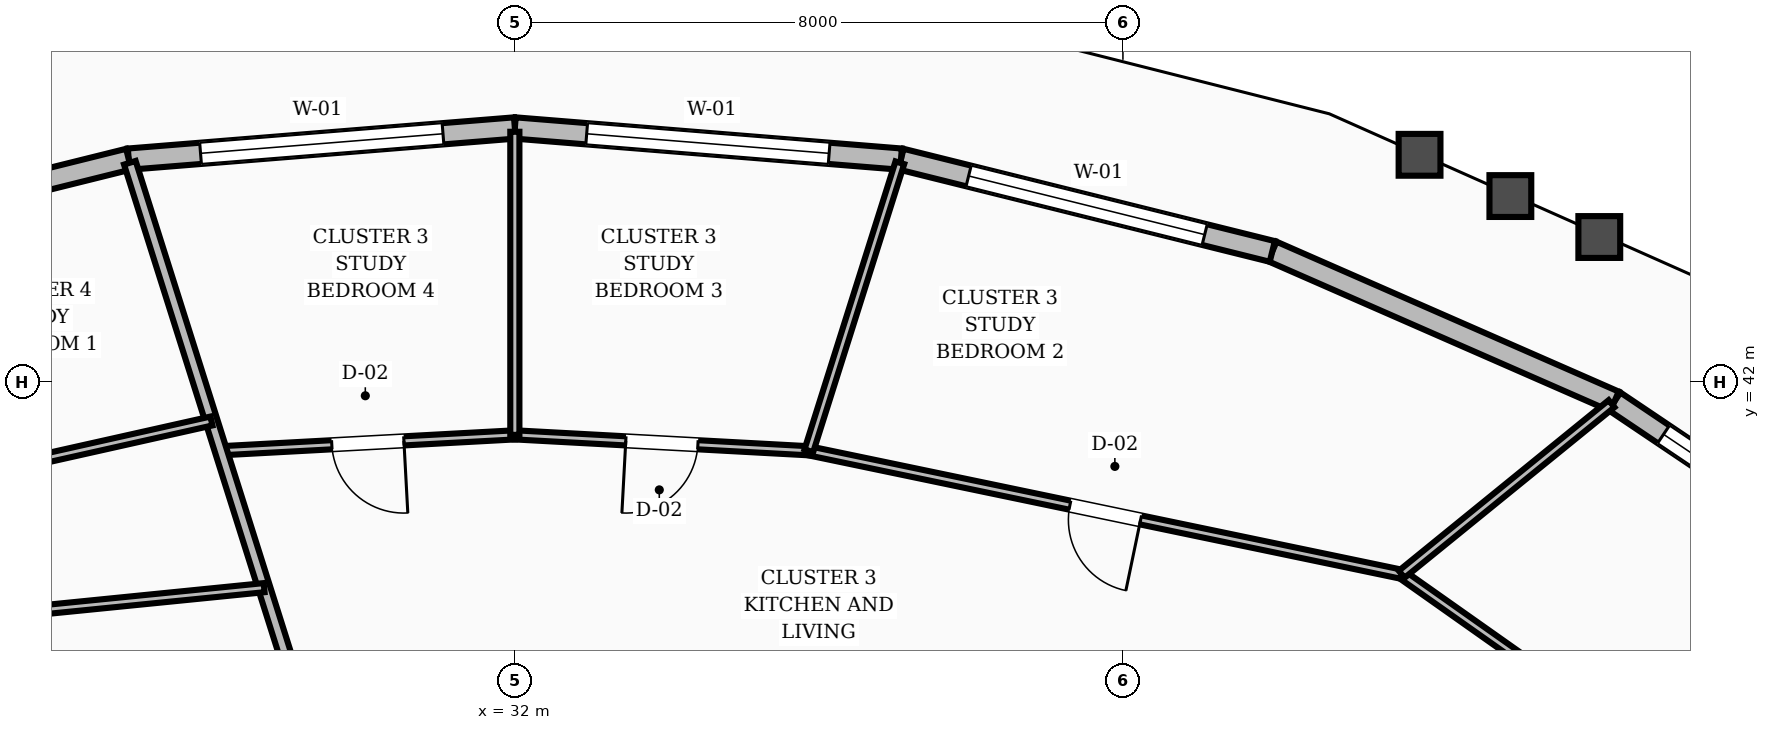
"""IFC4 building model, lengths in metres.
Left out: names, types, materials, properties, quantities, classifications, styles, units other than length and angle.
Written with IfcOpenShell. Run it as: python <this file> out.ifc"""

import sys

from ifc_helpers import new_model, si_unit, direction, frame, frame_2d, origin, place, context, subcontext, project, spatial, rectangle, extrude, element, fill, save


model = new_model("IFC4")
c1 = context("Model", 3, precision=1e-05, world=origin(), true_north=direction((0.0, 1.0)))
c2 = subcontext(c1, "Body", "Model", "MODEL_VIEW")
j1 = project(units=[si_unit("LENGTHUNIT", "METRE"), si_unit("PLANEANGLEUNIT", "RADIAN")], contexts=[c1])
p1 = place(None, origin())
s1 = spatial("IfcSite", under=j1, at=p1, CompositionType="ELEMENT")
p2 = place(p1, origin())
s2 = spatial("IfcBuilding", under=s1, at=p2, CompositionType="ELEMENT")
p3 = place(p2, frame((0.0, 0.0, 174.8)))
s3 = spatial("IfcBuildingStorey", under=s2, at=p3, CompositionType="ELEMENT", Elevation=174.8)
p4 = place(p3, frame((50.413, 39.09, 0.0), z_axis=(0.0, 0.0, 1.0), x_axis=(-0.829776575502, 0.558095721851, 0.0)))
e1 = element("IfcWall", 1, at=p4, inside=s3, PredefinedType="STANDARD", context=c2, shape_type="SweptSolid", body=[
    extrude(rectangle(XDim=4.756, YDim=0.28, at=frame_2d((2.378, 0.0))), origin(), (0.0, 0.0, 1.0), 2.82),
])
p5 = place(p4, frame((0.778, 0.0, 0.8)))
e2 = element("IfcOpeningElement", 2, at=p5, cuts=e1, PredefinedType="OPENING", context=c2, shape_type="SweptSolid", body=[
    extrude(rectangle(XDim=3.2, YDim=1.65, at=frame_2d((1.6, 0.825))), frame((0.0, 0.15, 0.0), z_axis=(0.0, -1.0, 0.0), x_axis=(1.0, 0.0, 0.0)), (0.0, 0.0, 1.0), 0.3),
])
p6 = place(p3, frame((46.467, 41.744, 0.0), z_axis=(0.0, 0.0, 1.0), x_axis=(-0.915983961181, 0.401214883647, 0.0)))
e3 = element("IfcWall", 3, at=p6, inside=s3, PredefinedType="STANDARD", context=c2, shape_type="SweptSolid", body=[
    extrude(rectangle(XDim=4.915, YDim=0.28, at=frame_2d((2.458, 0.0))), origin(), (0.0, 0.0, 1.0), 2.82),
])
p7 = place(p3, frame((41.965, 43.716, 0.0), z_axis=(0.0, 0.0, 1.0), x_axis=(-0.970464034564, 0.241245844766, 0.0)))
e4 = element("IfcWall", 4, at=p7, inside=s3, PredefinedType="STANDARD", context=c2, shape_type="SweptSolid", body=[
    extrude(rectangle(XDim=5.034, YDim=0.28, at=frame_2d((2.517, 0.0))), origin(), (0.0, 0.0, 1.0), 2.82),
])
p8 = place(p7, frame((0.917, 0.0, 0.8)))
e5 = element("IfcOpeningElement", 5, at=p8, cuts=e4, PredefinedType="OPENING", context=c2, shape_type="SweptSolid", body=[
    extrude(rectangle(XDim=3.2, YDim=1.65, at=frame_2d((1.6, 0.825))), frame((0.0, 0.15, 0.0), z_axis=(0.0, -1.0, 0.0), x_axis=(1.0, 0.0, 0.0)), (0.0, 0.0, 1.0), 0.3),
])
p9 = place(p3, frame((37.08, 44.93, 0.0), z_axis=(0.0, 0.0, 1.0), x_axis=(-0.996756522082, 0.080476305128, 0.0)))
e6 = element("IfcWall", 6, at=p9, inside=s3, PredefinedType="STANDARD", context=c2, shape_type="SweptSolid", body=[
    extrude(rectangle(XDim=5.097, YDim=0.28, at=frame_2d((2.548, 0.0))), origin(), (0.0, 0.0, 1.0), 2.82),
])
p10 = place(p9, frame((0.948, 0.0, 0.8)))
e7 = element("IfcOpeningElement", 7, at=p10, cuts=e6, PredefinedType="OPENING", context=c2, shape_type="SweptSolid", body=[
    extrude(rectangle(XDim=3.2, YDim=1.65, at=frame_2d((1.6, 0.825))), frame((0.0, 0.15, 0.0), z_axis=(0.0, -1.0, 0.0), x_axis=(1.0, 0.0, 0.0)), (0.0, 0.0, 1.0), 0.3),
])
p11 = place(p3, frame((32.0, 45.34, 0.0), z_axis=(0.0, 0.0, 1.0), x_axis=(-0.996756522082, -0.080476305128, 0.0)))
e8 = element("IfcWall", 8, at=p11, inside=s3, PredefinedType="STANDARD", context=c2, shape_type="SweptSolid", body=[
    extrude(rectangle(XDim=5.097, YDim=0.28, at=frame_2d((2.548, 0.0))), origin(), (0.0, 0.0, 1.0), 2.82),
])
p12 = place(p11, frame((0.948, 0.0, 0.8)))
e9 = element("IfcOpeningElement", 9, at=p12, cuts=e8, PredefinedType="OPENING", context=c2, shape_type="SweptSolid", body=[
    extrude(rectangle(XDim=3.2, YDim=1.65, at=frame_2d((1.6, 0.825))), frame((0.0, 0.15, 0.0), z_axis=(0.0, -1.0, 0.0), x_axis=(1.0, 0.0, 0.0)), (0.0, 0.0, 1.0), 0.3),
])
p13 = place(p3, frame((26.92, 44.93, 0.0), z_axis=(0.0, 0.0, 1.0), x_axis=(-0.970464034564, -0.241245844766, 0.0)))
e10 = element("IfcWall", 10, at=p13, inside=s3, PredefinedType="STANDARD", context=c2, shape_type="SweptSolid", body=[
    extrude(rectangle(XDim=5.034, YDim=0.28, at=frame_2d((2.517, 0.0))), origin(), (0.0, 0.0, 1.0), 2.82),
])
p14 = place(p3, frame((50.221, 34.843, 0.0), z_axis=(0.0, 0.0, 1.0), x_axis=(-0.817010879992, 0.57662225241, 0.0)))
e11 = element("IfcWall", 11, at=p14, inside=s3, PredefinedType="PARTITIONING", context=c2, shape_type="SweptSolid", body=[
    extrude(rectangle(XDim=8.021, YDim=0.12, at=frame_2d((4.011, 0.0))), origin(), (0.0, 0.0, 1.0), 2.8),
])
p15 = place(p14, frame((4.898, 0.0, 0.0)))
e12 = element("IfcOpeningElement", 12, at=p15, cuts=e11, PredefinedType="OPENING", context=c2, shape_type="SweptSolid", body=[
    extrude(rectangle(XDim=0.95, YDim=2.1, at=frame_2d((0.475, 1.05))), frame((0.0, 0.07, 0.0), z_axis=(0.0, -1.0, 0.0), x_axis=(1.0, 0.0, 0.0)), (0.0, 0.0, 1.0), 0.14),
])
p16 = place(p3, frame((43.667, 39.468, 0.0), z_axis=(0.0, 0.0, 1.0), x_axis=(-0.978978125213, 0.203965267519, 0.0)))
e13 = element("IfcWall", 13, at=p16, inside=s3, PredefinedType="PARTITIONING", context=c2, shape_type="SweptSolid", body=[
    extrude(rectangle(XDim=7.967, YDim=0.12, at=frame_2d((3.983, 0.0))), origin(), (0.0, 0.0, 1.0), 2.8),
])
p17 = place(p16, frame((3.509, 0.0, 0.0)))
e14 = element("IfcOpeningElement", 14, at=p17, cuts=e13, PredefinedType="OPENING", context=c2, shape_type="SweptSolid", body=[
    extrude(rectangle(XDim=0.95, YDim=2.1, at=frame_2d((0.475, 1.05))), frame((0.0, 0.07, 0.0), z_axis=(0.0, -1.0, 0.0), x_axis=(1.0, 0.0, 0.0)), (0.0, 0.0, 1.0), 0.14),
])
p18 = place(p3, frame((43.667, 39.468, 0.0), z_axis=(0.0, 0.0, 1.0), x_axis=(0.776032133051, 0.630693371197, 0.0)))
e15 = element("IfcWall", 15, at=p18, inside=s3, PredefinedType="PARTITIONING", context=c2, shape_type="SweptSolid", body=[
    extrude(rectangle(XDim=3.558, YDim=0.12, at=frame_2d((1.779, 0.0))), origin(), (0.0, 0.0, 1.0), 2.8),
])
p19 = place(p3, frame((35.868, 41.093, 0.0), z_axis=(0.0, 0.0, 1.0), x_axis=(-0.998539976993, 0.054017722528, 0.0)))
e16 = element("IfcWall", 16, at=p19, inside=s3, PredefinedType="PARTITIONING", context=c2, shape_type="SweptSolid", body=[
    extrude(rectangle(XDim=3.873, YDim=0.12, at=frame_2d((1.937, 0.0))), origin(), (0.0, 0.0, 1.0), 2.8),
])
p20 = place(p19, frame((1.462, 0.0, 0.0)))
e17 = element("IfcOpeningElement", 17, at=p20, cuts=e16, PredefinedType="OPENING", context=c2, shape_type="SweptSolid", body=[
    extrude(rectangle(XDim=0.95, YDim=2.1, at=frame_2d((0.475, 1.05))), frame((0.0, 0.07, 0.0), z_axis=(0.0, -1.0, 0.0), x_axis=(1.0, 0.0, 0.0)), (0.0, 0.0, 1.0), 0.14),
])
p21 = place(p3, frame((35.868, 41.093, 0.0), z_axis=(0.0, 0.0, 1.0), x_axis=(0.30135188561, 0.953512999932, 0.0)))
e18 = element("IfcWall", 18, at=p21, inside=s3, PredefinedType="PARTITIONING", context=c2, shape_type="SweptSolid", body=[
    extrude(rectangle(XDim=3.974, YDim=0.12, at=frame_2d((1.987, 0.0))), origin(), (0.0, 0.0, 1.0), 2.8),
])
p22 = place(p3, frame((32.0, 41.302, 0.0), z_axis=(0.0, 0.0, 1.0), x_axis=(-0.998539976993, -0.054017722528, 0.0)))
e19 = element("IfcWall", 19, at=p22, inside=s3, PredefinedType="PARTITIONING", context=c2, shape_type="SweptSolid", body=[
    extrude(rectangle(XDim=3.873, YDim=0.12, at=frame_2d((1.937, 0.0))), origin(), (0.0, 0.0, 1.0), 2.8),
])
p23 = place(p22, frame((1.462, 0.0, 0.0)))
e20 = element("IfcOpeningElement", 20, at=p23, cuts=e19, PredefinedType="OPENING", context=c2, shape_type="SweptSolid", body=[
    extrude(rectangle(XDim=0.95, YDim=2.1, at=frame_2d((0.475, 1.05))), frame((0.0, 0.07, 0.0), z_axis=(0.0, -1.0, 0.0), x_axis=(1.0, 0.0, 0.0)), (0.0, 0.0, 1.0), 0.14),
])
p24 = place(p3, frame((32.0, 41.302, 0.0), z_axis=(0.0, 0.0, 1.0), x_axis=(0.0, 1.0, 0.0)))
e21 = element("IfcWall", 21, at=p24, inside=s3, PredefinedType="PARTITIONING", context=c2, shape_type="SweptSolid", body=[
    extrude(rectangle(XDim=3.988, YDim=0.12, at=frame_2d((1.994, 0.0))), origin(), (0.0, 0.0, 1.0), 2.8),
])
p25 = place(p3, frame((29.394, 37.1, 0.0), z_axis=(0.0, 0.0, 1.0), x_axis=(-0.301346102792, 0.953514827537, 0.0)))
e22 = element("IfcWall", 22, at=p25, inside=s3, PredefinedType="SOLIDWALL", context=c2, shape_type="SweptSolid", body=[
    extrude(rectangle(XDim=8.162, YDim=0.16, at=frame_2d((4.081, 0.0))), origin(), (0.0, 0.0, 1.0), 2.8),
])
p26 = place(p3, frame((28.701, 39.292, 0.0), z_axis=(0.0, 0.0, 1.0), x_axis=(-0.995030110262, -0.099574493074, 0.0)))
e23 = element("IfcWall", 23, at=p26, inside=s3, PredefinedType="PARTITIONING", context=c2, shape_type="SweptSolid", body=[
    extrude(rectangle(XDim=3.416, YDim=0.12, at=frame_2d((1.708, 0.0))), origin(), (0.0, 0.0, 1.0), 2.8),
])
p27 = place(p3, frame((26.574, 37.1, 0.0), z_axis=(0.0, 0.0, 1.0), x_axis=(-0.565712100387, 0.82460282529, 0.0)))
e24 = element("IfcWall", 24, at=p27, inside=s3, PredefinedType="PARTITIONING", context=c2, shape_type="SweptSolid", body=[
    extrude(rectangle(XDim=2.246, YDim=0.12, at=frame_2d((1.123, 0.0))), origin(), (0.0, 0.0, 1.0), 2.8),
])
p28 = place(p27, frame((0.44, 0.0, 0.0)))
e25 = element("IfcOpeningElement", 25, at=p28, cuts=e24, PredefinedType="OPENING", context=c2, shape_type="SweptSolid", body=[
    extrude(rectangle(XDim=0.86, YDim=2.1, at=frame_2d((0.43, 1.05))), frame((0.0, 0.07, 0.0), z_axis=(0.0, -1.0, 0.0), x_axis=(1.0, 0.0, 0.0)), (0.0, 0.0, 1.0), 0.14),
])
p29 = place(p3, frame((28.009, 41.485, 0.0), z_axis=(0.0, 0.0, 1.0), x_axis=(-0.975790457845, -0.218707527028, 0.0)))
e26 = element("IfcWall", 26, at=p29, inside=s3, PredefinedType="PARTITIONING", context=c2, shape_type="SweptSolid", body=[
    extrude(rectangle(XDim=8.159, YDim=0.12, at=frame_2d((4.08, 0.0))), origin(), (0.0, 0.0, 1.0), 2.8),
])
p30 = place(p29, frame((4.997, 0.0, 0.0)))
e27 = element("IfcOpeningElement", 27, at=p30, cuts=e26, PredefinedType="OPENING", context=c2, shape_type="SweptSolid", body=[
    extrude(rectangle(XDim=0.95, YDim=2.1, at=frame_2d((0.475, 1.05))), frame((0.0, 0.07, 0.0), z_axis=(0.0, -1.0, 0.0), x_axis=(1.0, 0.0, 0.0)), (0.0, 0.0, 1.0), 0.14),
])
p31 = place(p5, origin())
e28 = element("IfcWindow", 28, at=p31, inside=s3, PartitioningType="SINGLE_PANEL", PredefinedType="WINDOW", context=c2, shape_type="SweptSolid", body=[
    extrude(rectangle(XDim=3.2, YDim=1.65, at=frame_2d((1.6, 0.825))), frame((0.0, 0.03, 0.0), z_axis=(0.0, -1.0, 0.0), x_axis=(1.0, 0.0, 0.0)), (0.0, 0.0, 1.0), 0.06),
])
fill(e2, e28)
p32 = place(p8, origin())
e29 = element("IfcWindow", 29, at=p32, inside=s3, PartitioningType="SINGLE_PANEL", PredefinedType="WINDOW", context=c2, shape_type="SweptSolid", body=[
    extrude(rectangle(XDim=3.2, YDim=1.65, at=frame_2d((1.6, 0.825))), frame((0.0, 0.03, 0.0), z_axis=(0.0, -1.0, 0.0), x_axis=(1.0, 0.0, 0.0)), (0.0, 0.0, 1.0), 0.06),
])
fill(e5, e29)
p33 = place(p10, origin())
e30 = element("IfcWindow", 30, at=p33, inside=s3, PartitioningType="SINGLE_PANEL", PredefinedType="WINDOW", context=c2, shape_type="SweptSolid", body=[
    extrude(rectangle(XDim=3.2, YDim=1.65, at=frame_2d((1.6, 0.825))), frame((0.0, 0.03, 0.0), z_axis=(0.0, -1.0, 0.0), x_axis=(1.0, 0.0, 0.0)), (0.0, 0.0, 1.0), 0.06),
])
fill(e7, e30)
p34 = place(p12, origin())
e31 = element("IfcWindow", 31, at=p34, inside=s3, PartitioningType="SINGLE_PANEL", PredefinedType="WINDOW", context=c2, shape_type="SweptSolid", body=[
    extrude(rectangle(XDim=3.2, YDim=1.65, at=frame_2d((1.6, 0.825))), frame((0.0, 0.03, 0.0), z_axis=(0.0, -1.0, 0.0), x_axis=(1.0, 0.0, 0.0)), (0.0, 0.0, 1.0), 0.06),
])
fill(e9, e31)
p35 = place(p17, origin())
e32 = element("IfcDoor", 32, at=p35, inside=s3, OperationType="SINGLE_SWING_LEFT", PredefinedType="DOOR", context=c2, shape_type="SweptSolid", body=[
    extrude(rectangle(XDim=0.95, YDim=2.1, at=frame_2d((0.475, 1.05))), frame((0.0, 0.025, 0.0), z_axis=(0.0, -1.0, 0.0), x_axis=(1.0, 0.0, 0.0)), (0.0, 0.0, 1.0), 0.05),
])
fill(e14, e32)
p36 = place(p20, origin())
e33 = element("IfcDoor", 33, at=p36, inside=s3, OperationType="SINGLE_SWING_RIGHT", PredefinedType="DOOR", context=c2, shape_type="SweptSolid", body=[
    extrude(rectangle(XDim=0.95, YDim=2.1, at=frame_2d((0.475, 1.05))), frame((0.0, 0.025, 0.0), z_axis=(0.0, -1.0, 0.0), x_axis=(1.0, 0.0, 0.0)), (0.0, 0.0, 1.0), 0.05),
])
fill(e17, e33)
p37 = place(p23, origin())
e34 = element("IfcDoor", 34, at=p37, inside=s3, OperationType="SINGLE_SWING_LEFT", PredefinedType="DOOR", context=c2, shape_type="SweptSolid", body=[
    extrude(rectangle(XDim=0.95, YDim=2.1, at=frame_2d((0.475, 1.05))), frame((0.0, 0.025, 0.0), z_axis=(0.0, -1.0, 0.0), x_axis=(1.0, 0.0, 0.0)), (0.0, 0.0, 1.0), 0.05),
])
fill(e20, e34)
save(model, sys.argv[1])
